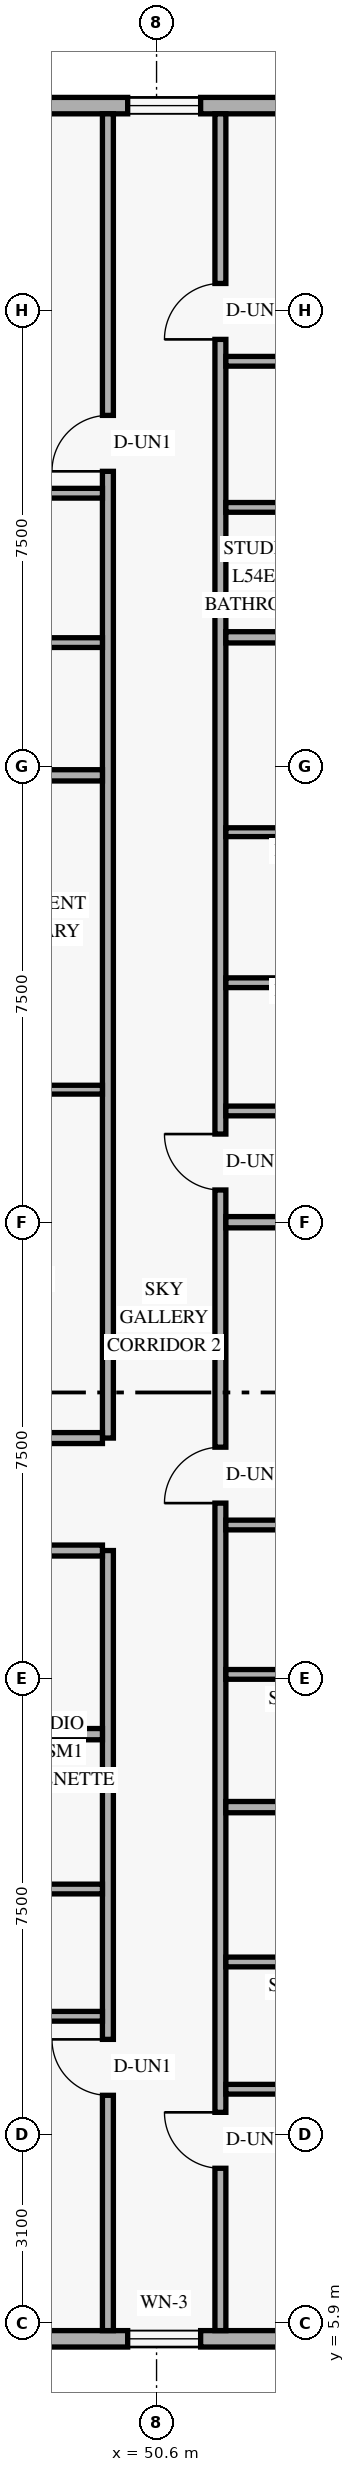
"""IFC4 building model, lengths in metres.
Left out: names, types, materials, properties, quantities, classifications, styles, units other than length and angle.
Written with IfcOpenShell. Run it as: python <this file> out.ifc"""

import sys

from ifc_helpers import new_model, si_unit, direction, frame, frame_2d, origin, place, context, subcontext, project, spatial, rectangle, extrude, element, fill, save


model = new_model("IFC4")
c1 = context("Model", 3, precision=1e-05, world=origin(), true_north=direction((0.0, 1.0)))
c2 = subcontext(c1, "Body", "Model", "MODEL_VIEW")
j1 = project(units=[si_unit("LENGTHUNIT", "METRE"), si_unit("PLANEANGLEUNIT", "RADIAN")], contexts=[c1])
p1 = place(None, origin())
s1 = spatial("IfcSite", under=j1, at=p1, CompositionType="ELEMENT")
p2 = place(p1, origin())
s2 = spatial("IfcBuilding", under=s1, at=p2, CompositionType="ELEMENT")
p3 = place(p2, frame((0.0, 0.0, 209.4)))
s3 = spatial("IfcBuildingStorey", under=s2, at=p3, CompositionType="ELEMENT", Elevation=209.4)
p4 = place(p3, frame((25.82, 5.635, 0.0), z_axis=(0.0, 0.0, 1.0), x_axis=(1.0, 0.0, 0.0)))
e1 = element("IfcWall", 1, at=p4, inside=s3, PredefinedType="SOLIDWALL", context=c2, shape_type="SweptSolid", body=[
    extrude(rectangle(XDim=32.96, YDim=0.27, at=frame_2d((16.48, 0.0))), origin(), (0.0, 0.0, 1.0), 3.36),
])
p5 = place(p4, frame((3.87, 0.0, 0.85)))
e2 = element("IfcOpeningElement", 2, at=p5, cuts=e1, PredefinedType="OPENING", context=c2, shape_type="SweptSolid", body=[
    extrude(rectangle(XDim=1.2, YDim=1.5, at=frame_2d((0.6, 0.75))), frame((0.0, 0.145, 0.0), z_axis=(0.0, -1.0, 0.0), x_axis=(1.0, 0.0, 0.0)), (0.0, 0.0, 1.0), 0.29),
])
p6 = place(p4, frame((18.961, 0.0, 0.85)))
e3 = element("IfcOpeningElement", 3, at=p6, cuts=e1, PredefinedType="OPENING", context=c2, shape_type="SweptSolid", body=[
    extrude(rectangle(XDim=1.2, YDim=1.5, at=frame_2d((0.6, 0.75))), frame((0.0, 0.145, 0.0), z_axis=(0.0, -1.0, 0.0), x_axis=(1.0, 0.0, 0.0)), (0.0, 0.0, 1.0), 0.29),
])
p7 = place(p4, frame((24.305, 0.0, 0.85)))
e4 = element("IfcOpeningElement", 4, at=p7, cuts=e1, PredefinedType="OPENING", context=c2, shape_type="SweptSolid", body=[
    extrude(rectangle(XDim=1.2, YDim=1.5, at=frame_2d((0.6, 0.75))), frame((0.0, 0.145, 0.0), z_axis=(0.0, -1.0, 0.0), x_axis=(1.0, 0.0, 0.0)), (0.0, 0.0, 1.0), 0.29),
])
p8 = place(p4, frame((30.643, 0.0, 0.85)))
e5 = element("IfcOpeningElement", 5, at=p8, cuts=e1, PredefinedType="OPENING", context=c2, shape_type="SweptSolid", body=[
    extrude(rectangle(XDim=1.2, YDim=1.5, at=frame_2d((0.6, 0.75))), frame((0.0, 0.145, 0.0), z_axis=(0.0, -1.0, 0.0), x_axis=(1.0, 0.0, 0.0)), (0.0, 0.0, 1.0), 0.29),
])
p9 = place(p3, frame((58.78, 42.365, 0.0), z_axis=(0.0, 0.0, 1.0), x_axis=(-1.0, 0.0, 0.0)))
e6 = element("IfcWall", 6, at=p9, inside=s3, PredefinedType="SOLIDWALL", context=c2, shape_type="SweptSolid", body=[
    extrude(rectangle(XDim=32.96, YDim=0.27, at=frame_2d((16.48, 0.0))), origin(), (0.0, 0.0, 1.0), 3.36),
])
p10 = place(p9, frame((27.89, 0.0, 0.85)))
e7 = element("IfcOpeningElement", 7, at=p10, cuts=e6, PredefinedType="OPENING", context=c2, shape_type="SweptSolid", body=[
    extrude(rectangle(XDim=1.2, YDim=1.5, at=frame_2d((0.6, 0.75))), frame((0.0, 0.145, 0.0), z_axis=(0.0, -1.0, 0.0), x_axis=(1.0, 0.0, 0.0)), (0.0, 0.0, 1.0), 0.29),
])
p11 = place(p9, frame((15.486, 0.0, 0.85)))
e8 = element("IfcOpeningElement", 8, at=p11, cuts=e6, PredefinedType="OPENING", context=c2, shape_type="SweptSolid", body=[
    extrude(rectangle(XDim=1.2, YDim=1.5, at=frame_2d((0.6, 0.75))), frame((0.0, 0.145, 0.0), z_axis=(0.0, -1.0, 0.0), x_axis=(1.0, 0.0, 0.0)), (0.0, 0.0, 1.0), 0.29),
])
p12 = place(p9, frame((7.455, 0.0, 0.85)))
e9 = element("IfcOpeningElement", 9, at=p12, cuts=e6, PredefinedType="OPENING", context=c2, shape_type="SweptSolid", body=[
    extrude(rectangle(XDim=1.2, YDim=1.5, at=frame_2d((0.6, 0.75))), frame((0.0, 0.145, 0.0), z_axis=(0.0, -1.0, 0.0), x_axis=(1.0, 0.0, 0.0)), (0.0, 0.0, 1.0), 0.29),
])
p13 = place(p9, frame((1.117, 0.0, 0.85)))
e10 = element("IfcOpeningElement", 10, at=p13, cuts=e6, PredefinedType="OPENING", context=c2, shape_type="SweptSolid", body=[
    extrude(rectangle(XDim=1.2, YDim=1.5, at=frame_2d((0.6, 0.75))), frame((0.0, 0.145, 0.0), z_axis=(0.0, -1.0, 0.0), x_axis=(1.0, 0.0, 0.0)), (0.0, 0.0, 1.0), 0.29),
])
p14 = place(p3, frame((49.8, 5.77, 0.0), z_axis=(0.0, 0.0, 1.0), x_axis=(0.0, 1.0, 0.0)))
e11 = element("IfcWall", 11, at=p14, inside=s3, PredefinedType="STANDARD", context=c2, shape_type="SweptSolid", body=[
    extrude(rectangle(XDim=12.83, YDim=0.18, at=frame_2d((6.415, 0.0))), origin(), (0.0, 0.0, 1.0), 2.803),
])
p15 = place(p14, frame((3.87, 0.0, 0.0)))
e12 = element("IfcOpeningElement", 12, at=p15, cuts=e11, PredefinedType="OPENING", context=c2, shape_type="SweptSolid", body=[
    extrude(rectangle(XDim=0.92, YDim=2.15, at=frame_2d((0.46, 1.075))), frame((0.0, 0.1, 0.0), z_axis=(0.0, -1.0, 0.0), x_axis=(1.0, 0.0, 0.0)), (0.0, 0.0, 1.0), 0.2),
])
p16 = place(p3, frame((49.8, 20.45, 0.0), z_axis=(0.0, 0.0, 1.0), x_axis=(0.0, 1.0, 0.0)))
e13 = element("IfcWall", 13, at=p16, inside=s3, PredefinedType="STANDARD", context=c2, shape_type="SweptSolid", body=[
    extrude(rectangle(XDim=21.78, YDim=0.18, at=frame_2d((10.89, 0.0))), origin(), (0.0, 0.0, 1.0), 2.803),
])
p17 = place(p16, frame((15.9, 0.0, 0.0)))
e14 = element("IfcOpeningElement", 14, at=p17, cuts=e13, PredefinedType="OPENING", context=c2, shape_type="SweptSolid", body=[
    extrude(rectangle(XDim=0.92, YDim=2.15, at=frame_2d((0.46, 1.075))), frame((0.0, 0.1, 0.0), z_axis=(0.0, -1.0, 0.0), x_axis=(1.0, 0.0, 0.0)), (0.0, 0.0, 1.0), 0.2),
])
p18 = place(p3, frame((37.64, 18.6, 0.0), z_axis=(0.0, 0.0, 1.0), x_axis=(1.0, 0.0, 0.0)))
e15 = element("IfcWall", 15, at=p18, inside=s3, PredefinedType="STANDARD", context=c2, shape_type="SweptSolid", body=[
    extrude(rectangle(XDim=12.07, YDim=0.18, at=frame_2d((6.035, 0.0))), origin(), (0.0, 0.0, 1.0), 2.803),
])
p19 = place(p3, frame((37.64, 20.45, 0.0), z_axis=(0.0, 0.0, 1.0), x_axis=(1.0, 0.0, 0.0)))
e16 = element("IfcWall", 16, at=p19, inside=s3, PredefinedType="STANDARD", context=c2, shape_type="SweptSolid", body=[
    extrude(rectangle(XDim=12.07, YDim=0.18, at=frame_2d((6.035, 0.0))), origin(), (0.0, 0.0, 1.0), 2.803),
])
p20 = place(p19, frame((0.32, 0.0, 0.0)))
e17 = element("IfcOpeningElement", 17, at=p20, cuts=e16, PredefinedType="OPENING", context=c2, shape_type="SweptSolid", body=[
    extrude(rectangle(XDim=0.92, YDim=2.15, at=frame_2d((0.46, 1.075))), frame((0.0, 0.1, 0.0), z_axis=(0.0, -1.0, 0.0), x_axis=(1.0, 0.0, 0.0)), (0.0, 0.0, 1.0), 0.2),
])
p21 = place(p3, frame((51.65, 5.77, 0.0), z_axis=(0.0, 0.0, 1.0), x_axis=(0.0, 1.0, 0.0)))
e18 = element("IfcWall", 18, at=p21, inside=s3, PredefinedType="STANDARD", context=c2, shape_type="SweptSolid", body=[
    extrude(rectangle(XDim=36.46, YDim=0.18, at=frame_2d((18.23, 0.0))), origin(), (0.0, 0.0, 1.0), 2.803),
])
p22 = place(p21, frame((2.67, 0.0, 0.0)))
e19 = element("IfcOpeningElement", 19, at=p22, cuts=e18, PredefinedType="OPENING", context=c2, shape_type="SweptSolid", body=[
    extrude(rectangle(XDim=0.92, YDim=2.15, at=frame_2d((0.46, 1.075))), frame((0.0, 0.1, 0.0), z_axis=(0.0, -1.0, 0.0), x_axis=(1.0, 0.0, 0.0)), (0.0, 0.0, 1.0), 0.2),
])
p23 = place(p21, frame((13.61, 0.0, 0.0)))
e20 = element("IfcOpeningElement", 20, at=p23, cuts=e18, PredefinedType="OPENING", context=c2, shape_type="SweptSolid", body=[
    extrude(rectangle(XDim=0.92, YDim=2.15, at=frame_2d((0.46, 1.075))), frame((0.0, 0.1, 0.0), z_axis=(0.0, -1.0, 0.0), x_axis=(1.0, 0.0, 0.0)), (0.0, 0.0, 1.0), 0.2),
])
p24 = place(p21, frame((18.76, 0.0, 0.0)))
e21 = element("IfcOpeningElement", 21, at=p24, cuts=e18, PredefinedType="OPENING", context=c2, shape_type="SweptSolid", body=[
    extrude(rectangle(XDim=0.92, YDim=2.15, at=frame_2d((0.46, 1.075))), frame((0.0, 0.1, 0.0), z_axis=(0.0, -1.0, 0.0), x_axis=(1.0, 0.0, 0.0)), (0.0, 0.0, 1.0), 0.2),
])
p25 = place(p21, frame((32.75, 0.0, 0.0)))
e22 = element("IfcOpeningElement", 22, at=p25, cuts=e18, PredefinedType="OPENING", context=c2, shape_type="SweptSolid", body=[
    extrude(rectangle(XDim=0.92, YDim=2.15, at=frame_2d((0.46, 1.075))), frame((0.0, 0.1, 0.0), z_axis=(0.0, -1.0, 0.0), x_axis=(1.0, 0.0, 0.0)), (0.0, 0.0, 1.0), 0.2),
])
p26 = place(p3, frame((51.74, 9.74, 0.0), z_axis=(0.0, 0.0, 1.0), x_axis=(1.0, 0.0, 0.0)))
e23 = element("IfcWall", 23, at=p26, inside=s3, PredefinedType="PLUMBINGWALL", context=c2, shape_type="SweptSolid", body=[
    extrude(rectangle(XDim=5.53, YDim=0.16, at=frame_2d((2.765, 0.0))), origin(), (0.0, 0.0, 1.0), 2.879),
])
p27 = place(p3, frame((51.74, 11.833, 0.0), z_axis=(0.0, 0.0, 1.0), x_axis=(1.0, 0.0, 0.0)))
e24 = element("IfcWall", 24, at=p27, inside=s3, PredefinedType="PLUMBINGWALL", context=c2, shape_type="SweptSolid", body=[
    extrude(rectangle(XDim=5.37, YDim=0.16, at=frame_2d((2.685, 0.0))), origin(), (0.0, 0.0, 1.0), 2.879),
])
p28 = place(p3, frame((51.74, 14.38, 0.0), z_axis=(0.0, 0.0, 1.0), x_axis=(1.0, 0.0, 0.0)))
e25 = element("IfcWall", 25, at=p28, inside=s3, PredefinedType="PARTITIONING", context=c2, shape_type="SweptSolid", body=[
    extrude(rectangle(XDim=10.39, YDim=0.185, at=frame_2d((5.195, 0.0))), origin(), (0.0, 0.0, 1.0), 2.879),
])
p29 = place(p3, frame((51.74, 19.02, 0.0), z_axis=(0.0, 0.0, 1.0), x_axis=(1.0, 0.0, 0.0)))
e26 = element("IfcWall", 26, at=p29, inside=s3, PredefinedType="PLUMBINGWALL", context=c2, shape_type="SweptSolid", body=[
    extrude(rectangle(XDim=5.53, YDim=0.16, at=frame_2d((2.765, 0.0))), origin(), (0.0, 0.0, 1.0), 2.879),
])
p30 = place(p3, frame((51.74, 16.563, 0.0), z_axis=(0.0, 0.0, 1.0), x_axis=(1.0, 0.0, 0.0)))
e27 = element("IfcWall", 27, at=p30, inside=s3, PredefinedType="PLUMBINGWALL", context=c2, shape_type="SweptSolid", body=[
    extrude(rectangle(XDim=5.37, YDim=0.16, at=frame_2d((2.685, 0.0))), origin(), (0.0, 0.0, 1.0), 2.879),
])
p31 = place(p3, frame((51.74, 24.0, 0.0), z_axis=(0.0, 0.0, 1.0), x_axis=(1.0, 0.0, 0.0)))
e28 = element("IfcWall", 28, at=p31, inside=s3, PredefinedType="PARTITIONING", context=c2, shape_type="SweptSolid", body=[
    extrude(rectangle(XDim=10.39, YDim=0.185, at=frame_2d((5.195, 0.0))), origin(), (0.0, 0.0, 1.0), 2.879),
])
p32 = place(p3, frame((51.74, 30.415, 0.0), z_axis=(0.0, 0.0, 1.0), x_axis=(1.0, 0.0, 0.0)))
e29 = element("IfcWall", 29, at=p32, inside=s3, PredefinedType="PARTITIONING", context=c2, shape_type="SweptSolid", body=[
    extrude(rectangle(XDim=10.39, YDim=0.145, at=frame_2d((5.195, 0.0))), origin(), (0.0, 0.0, 1.0), 2.879),
])
p33 = place(p32, frame((5.69, 0.0, 0.0)))
e30 = element("IfcOpeningElement", 30, at=p33, cuts=e29, PredefinedType="OPENING", context=c2, shape_type="SweptSolid", body=[
    extrude(rectangle(XDim=0.88, YDim=2.12, at=frame_2d((0.44, 1.06))), frame((0.0, 0.083, 0.0), z_axis=(0.0, -1.0, 0.0), x_axis=(1.0, 0.0, 0.0)), (0.0, 0.0, 1.0), 0.165),
])
p34 = place(p32, frame((8.265, 0.0, 0.0)))
e31 = element("IfcOpeningElement", 31, at=p34, cuts=e29, PredefinedType="OPENING", context=c2, shape_type="SweptSolid", body=[
    extrude(rectangle(XDim=0.9, YDim=2.14, at=frame_2d((0.45, 1.07))), frame((0.0, 0.083, 0.0), z_axis=(0.0, -1.0, 0.0), x_axis=(1.0, 0.0, 0.0)), (0.0, 0.0, 1.0), 0.165),
])
p35 = place(p3, frame((51.74, 25.83, 0.0), z_axis=(0.0, 0.0, 1.0), x_axis=(1.0, 0.0, 0.0)))
e32 = element("IfcWall", 32, at=p35, inside=s3, PredefinedType="PLUMBINGWALL", context=c2, shape_type="SweptSolid", body=[
    extrude(rectangle(XDim=5.53, YDim=0.16, at=frame_2d((2.765, 0.0))), origin(), (0.0, 0.0, 1.0), 2.879),
])
p36 = place(p3, frame((51.74, 27.939, 0.0), z_axis=(0.0, 0.0, 1.0), x_axis=(1.0, 0.0, 0.0)))
e33 = element("IfcWall", 33, at=p36, inside=s3, PredefinedType="PLUMBINGWALL", context=c2, shape_type="SweptSolid", body=[
    extrude(rectangle(XDim=5.37, YDim=0.16, at=frame_2d((2.685, 0.0))), origin(), (0.0, 0.0, 1.0), 2.879),
])
p37 = place(p3, frame((51.74, 33.62, 0.0), z_axis=(0.0, 0.0, 1.0), x_axis=(1.0, 0.0, 0.0)))
e34 = element("IfcWall", 34, at=p37, inside=s3, PredefinedType="PARTITIONING", context=c2, shape_type="SweptSolid", body=[
    extrude(rectangle(XDim=10.39, YDim=0.185, at=frame_2d((5.195, 0.0))), origin(), (0.0, 0.0, 1.0), 2.879),
])
p38 = place(p3, frame((51.74, 38.16, 0.0), z_axis=(0.0, 0.0, 1.0), x_axis=(1.0, 0.0, 0.0)))
e35 = element("IfcWall", 35, at=p38, inside=s3, PredefinedType="PLUMBINGWALL", context=c2, shape_type="SweptSolid", body=[
    extrude(rectangle(XDim=2.834, YDim=0.16, at=frame_2d((1.417, 0.0))), origin(), (0.0, 0.0, 1.0), 3.36),
])
p39 = place(p3, frame((51.74, 35.757, 0.0), z_axis=(0.0, 0.0, 1.0), x_axis=(1.0, 0.0, 0.0)))
e36 = element("IfcWall", 36, at=p39, inside=s3, PredefinedType="PLUMBINGWALL", context=c2, shape_type="SweptSolid", body=[
    extrude(rectangle(XDim=2.674, YDim=0.16, at=frame_2d((1.337, 0.0))), origin(), (0.0, 0.0, 1.0), 3.36),
])
p40 = place(p3, frame((38.022, 15.58, 0.0), z_axis=(0.0, 0.0, 1.0), x_axis=(1.0, 0.0, 0.0)))
e37 = element("IfcWall", 37, at=p40, inside=s3, PredefinedType="PARTITIONING", context=c2, shape_type="SweptSolid", body=[
    extrude(rectangle(XDim=11.688, YDim=0.185, at=frame_2d((5.844, 0.0))), origin(), (0.0, 0.0, 1.0), 2.803),
])
p41 = place(p3, frame((47.18, 10.94, 0.0), z_axis=(0.0, 0.0, 1.0), x_axis=(1.0, 0.0, 0.0)))
e38 = element("IfcWall", 38, at=p41, inside=s3, PredefinedType="PLUMBINGWALL", context=c2, shape_type="SweptSolid", body=[
    extrude(rectangle(XDim=2.53, YDim=0.16, at=frame_2d((1.265, 0.0))), origin(), (0.0, 0.0, 1.0), 2.803),
])
p42 = place(p3, frame((47.34, 13.033, 0.0), z_axis=(0.0, 0.0, 1.0), x_axis=(1.0, 0.0, 0.0)))
e39 = element("IfcWall", 39, at=p42, inside=s3, PredefinedType="PLUMBINGWALL", context=c2, shape_type="SweptSolid", body=[
    extrude(rectangle(XDim=2.37, YDim=0.16, at=frame_2d((1.185, 0.0))), origin(), (0.0, 0.0, 1.0), 2.803),
])
p43 = place(p3, frame((38.573, 31.35, 0.0), z_axis=(0.0, 0.0, 1.0), x_axis=(1.0, 0.0, 0.0)))
e40 = element("IfcWall", 40, at=p43, inside=s3, PredefinedType="PARTITIONING", context=c2, shape_type="SweptSolid", body=[
    extrude(rectangle(XDim=11.137, YDim=0.185, at=frame_2d((5.569, 0.0))), origin(), (0.0, 0.0, 1.0), 2.803),
])
p44 = place(p3, frame((44.89, 26.18, 0.0), z_axis=(0.0, 0.0, 1.0), x_axis=(1.0, 0.0, 0.0)))
e41 = element("IfcWall", 41, at=p44, inside=s3, PredefinedType="PARTITIONING", context=c2, shape_type="SweptSolid", body=[
    extrude(rectangle(XDim=4.82, YDim=0.145, at=frame_2d((2.41, 0.0))), origin(), (0.0, 0.0, 1.0), 2.803),
])
p45 = place(p3, frame((47.104, 35.99, 0.0), z_axis=(0.0, 0.0, 1.0), x_axis=(1.0, 0.0, 0.0)))
e42 = element("IfcWall", 42, at=p45, inside=s3, PredefinedType="PLUMBINGWALL", context=c2, shape_type="SweptSolid", body=[
    extrude(rectangle(XDim=2.606, YDim=0.16, at=frame_2d((1.303, 0.0))), origin(), (0.0, 0.0, 1.0), 2.803),
])
p46 = place(p3, frame((47.264, 33.533, 0.0), z_axis=(0.0, 0.0, 1.0), x_axis=(1.0, 0.0, 0.0)))
e43 = element("IfcWall", 43, at=p46, inside=s3, PredefinedType="PLUMBINGWALL", context=c2, shape_type="SweptSolid", body=[
    extrude(rectangle(XDim=2.446, YDim=0.16, at=frame_2d((1.223, 0.0))), origin(), (0.0, 0.0, 1.0), 2.803),
])
p47 = place(p7, origin())
e44 = element("IfcWindow", 44, at=p47, inside=s3, PartitioningType="SINGLE_PANEL", PredefinedType="WINDOW", context=c2, shape_type="SweptSolid", body=[
    extrude(rectangle(XDim=1.2, YDim=1.5, at=frame_2d((0.6, 0.75))), frame((0.0, 0.03, 0.0), z_axis=(0.0, -1.0, 0.0), x_axis=(1.0, 0.0, 0.0)), (0.0, 0.0, 1.0), 0.06),
])
fill(e4, e44)
p48 = place(p12, origin())
e45 = element("IfcWindow", 45, at=p48, inside=s3, PartitioningType="SINGLE_PANEL", PredefinedType="WINDOW", context=c2, shape_type="SweptSolid", body=[
    extrude(rectangle(XDim=1.2, YDim=1.5, at=frame_2d((0.6, 0.75))), frame((0.0, 0.03, 0.0), z_axis=(0.0, -1.0, 0.0), x_axis=(1.0, 0.0, 0.0)), (0.0, 0.0, 1.0), 0.06),
])
fill(e9, e45)
p49 = place(p22, origin())
e46 = element("IfcDoor", 46, at=p49, inside=s3, OperationType="SINGLE_SWING_RIGHT", PredefinedType="DOOR", context=c2, shape_type="SweptSolid", body=[
    extrude(rectangle(XDim=0.92, YDim=2.15, at=frame_2d((0.46, 1.075))), frame((0.0, 0.025, 0.0), z_axis=(0.0, -1.0, 0.0), x_axis=(1.0, 0.0, 0.0)), (0.0, 0.0, 1.0), 0.05),
])
fill(e19, e46)
p50 = place(p23, origin())
e47 = element("IfcDoor", 47, at=p50, inside=s3, OperationType="SINGLE_SWING_LEFT", PredefinedType="DOOR", context=c2, shape_type="SweptSolid", body=[
    extrude(rectangle(XDim=0.92, YDim=2.15, at=frame_2d((0.46, 1.075))), frame((0.0, 0.025, 0.0), z_axis=(0.0, -1.0, 0.0), x_axis=(1.0, 0.0, 0.0)), (0.0, 0.0, 1.0), 0.05),
])
fill(e20, e47)
p51 = place(p24, origin())
e48 = element("IfcDoor", 48, at=p51, inside=s3, OperationType="SINGLE_SWING_RIGHT", PredefinedType="DOOR", context=c2, shape_type="SweptSolid", body=[
    extrude(rectangle(XDim=0.92, YDim=2.15, at=frame_2d((0.46, 1.075))), frame((0.0, 0.025, 0.0), z_axis=(0.0, -1.0, 0.0), x_axis=(1.0, 0.0, 0.0)), (0.0, 0.0, 1.0), 0.05),
])
fill(e21, e48)
p52 = place(p25, origin())
e49 = element("IfcDoor", 49, at=p52, inside=s3, OperationType="SINGLE_SWING_LEFT", PredefinedType="DOOR", context=c2, shape_type="SweptSolid", body=[
    extrude(rectangle(XDim=0.92, YDim=2.15, at=frame_2d((0.46, 1.075))), frame((0.0, 0.025, 0.0), z_axis=(0.0, -1.0, 0.0), x_axis=(1.0, 0.0, 0.0)), (0.0, 0.0, 1.0), 0.05),
])
fill(e22, e49)
p53 = place(p15, origin())
e50 = element("IfcDoor", 50, at=p53, inside=s3, OperationType="SINGLE_SWING_RIGHT", PredefinedType="DOOR", context=c2, shape_type="SweptSolid", body=[
    extrude(rectangle(XDim=0.92, YDim=2.15, at=frame_2d((0.46, 1.075))), frame((0.0, 0.025, 0.0), z_axis=(0.0, -1.0, 0.0), x_axis=(1.0, 0.0, 0.0)), (0.0, 0.0, 1.0), 0.05),
])
fill(e12, e50)
p54 = place(p17, origin())
e51 = element("IfcDoor", 51, at=p54, inside=s3, OperationType="SINGLE_SWING_LEFT", PredefinedType="DOOR", context=c2, shape_type="SweptSolid", body=[
    extrude(rectangle(XDim=0.92, YDim=2.15, at=frame_2d((0.46, 1.075))), frame((0.0, 0.025, 0.0), z_axis=(0.0, -1.0, 0.0), x_axis=(1.0, 0.0, 0.0)), (0.0, 0.0, 1.0), 0.05),
])
fill(e14, e51)
save(model, sys.argv[1])
